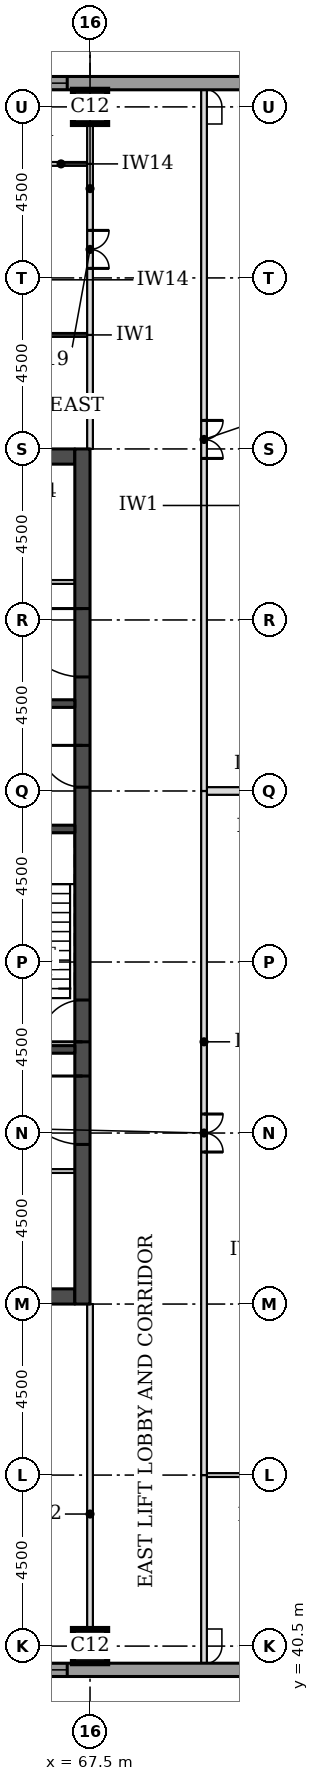
"""IFC4 building model, lengths in metres.
Left out: names, types, materials, properties, quantities, classifications, styles, units other than length and angle.
Written with IfcOpenShell. Run it as: python <this file> out.ifc"""

import sys

from ifc_helpers import new_model, si_unit, direction, frame, frame_2d, origin, origin_2d, place, context, subcontext, project, spatial, rectangle, extrude, element, fill, save


model = new_model("IFC4")
c1 = context("Model", 3, precision=1e-05, world=origin(), true_north=direction((0.0, 1.0)))
c2 = subcontext(c1, "Body", "Model", "MODEL_VIEW")
j1 = project(units=[si_unit("LENGTHUNIT", "METRE"), si_unit("PLANEANGLEUNIT", "RADIAN")], contexts=[c1])
p1 = place(None, origin())
s1 = spatial("IfcSite", under=j1, at=p1, CompositionType="ELEMENT")
p2 = place(p1, origin())
s2 = spatial("IfcBuilding", under=s1, at=p2, CompositionType="ELEMENT")
p3 = place(p2, frame((0.0, 0.0, 245.2)))
s3 = spatial("IfcBuildingStorey", under=s2, at=p3, CompositionType="ELEMENT", Elevation=245.2)
for number, where, z_axis, x_axis in (
    (1, (67.5, 40.5, 0.0), (0.0, 0.0, 1.0), (1.0, 0.0, 0.0)),
    (2, (67.5, 81.0, 0.0), (0.0, 0.0, 1.0), (1.0, 0.0, 0.0)),
):
    element("IfcColumn", number, at=place(p3, frame(where, z_axis=z_axis, x_axis=x_axis)), inside=s3, PredefinedType="COLUMN", context=c2, shape_type="SweptSolid", body=[
        extrude(rectangle(XDim=0.9, YDim=0.9, at=origin_2d()), origin(), (0.0, 0.0, 1.0), 3.7),
    ])
for number, where, z_axis, x_axis in (
    (3, (45.4, 49.7, 0.0), (0.0, 0.0, 1.0), (1.0, 0.0, 0.0)),
    (4, (45.4, 71.8, 0.0), (0.0, 0.0, 1.0), (1.0, 0.0, 0.0)),
):
    element("IfcWall", number, at=place(p3, frame(where, z_axis=z_axis, x_axis=x_axis)), inside=s3, PredefinedType="SHEAR", context=c2, shape_type="SweptSolid", body=[
        extrude(rectangle(XDim=21.7, YDim=0.4, at=frame_2d((10.85, 0.0))), origin(), (0.0, 0.0, 1.0), 3.7),
    ])
p4 = place(p3, frame((67.3, 49.5, 0.0), z_axis=(0.0, 0.0, 1.0), x_axis=(0.0, 1.0, 0.0)))
e5 = element("IfcWall", 5, at=p4, inside=s3, PredefinedType="SHEAR", context=c2, shape_type="SweptSolid", body=[
    extrude(rectangle(XDim=22.5, YDim=0.4, at=frame_2d((11.25, 0.0))), origin(), (0.0, 0.0, 1.0), 3.7),
])
p5 = place(p4, frame((4.2, 0.0, 0.0)))
e6 = element("IfcOpeningElement", 6, at=p5, cuts=e5, PredefinedType="OPENING", context=c2, shape_type="SweptSolid", body=[
    extrude(rectangle(XDim=1.8, YDim=2.1, at=frame_2d((0.9, 1.05))), frame((0.0, 0.21, 0.0), z_axis=(0.0, -1.0, 0.0), x_axis=(1.0, 0.0, 0.0)), (0.0, 0.0, 1.0), 0.42),
])
p6 = place(p4, frame((6.9, 0.0, 0.0)))
e7 = element("IfcOpeningElement", 7, at=p6, cuts=e5, PredefinedType="OPENING", context=c2, shape_type="SweptSolid", body=[
    extrude(rectangle(XDim=1.1, YDim=2.1, at=frame_2d((0.55, 1.05))), frame((0.0, 0.21, 0.0), z_axis=(0.0, -1.0, 0.0), x_axis=(1.0, 0.0, 0.0)), (0.0, 0.0, 1.0), 0.42),
])
p7 = place(p4, frame((13.6, 0.0, 0.0)))
e8 = element("IfcOpeningElement", 8, at=p7, cuts=e5, PredefinedType="OPENING", context=c2, shape_type="SweptSolid", body=[
    extrude(rectangle(XDim=1.1, YDim=2.1, at=frame_2d((0.55, 1.05))), frame((0.0, 0.21, 0.0), z_axis=(0.0, -1.0, 0.0), x_axis=(1.0, 0.0, 0.0)), (0.0, 0.0, 1.0), 0.42),
])
p8 = place(p4, frame((16.5, 0.0, 0.0)))
e9 = element("IfcOpeningElement", 9, at=p8, cuts=e5, PredefinedType="OPENING", context=c2, shape_type="SweptSolid", body=[
    extrude(rectangle(XDim=1.8, YDim=2.1, at=frame_2d((0.9, 1.05))), frame((0.0, 0.21, 0.0), z_axis=(0.0, -1.0, 0.0), x_axis=(1.0, 0.0, 0.0)), (0.0, 0.0, 1.0), 0.42),
])
p9 = place(p3, frame((36.0, 39.875, 0.0), z_axis=(0.0, 0.0, 1.0), x_axis=(1.0, 0.0, 0.0)))
e10 = element("IfcWall", 10, at=p9, inside=s3, PredefinedType="STANDARD", context=c2, shape_type="SweptSolid", body=[
    extrude(rectangle(XDim=36.331, YDim=0.35, at=frame_2d((18.166, 0.0))), origin(), (0.0, 0.0, 1.0), 3.525),
])
p10 = place(p9, frame((5.1, 0.0, 0.9)))
e11 = element("IfcOpeningElement", 11, at=p10, cuts=e10, PredefinedType="OPENING", context=c2, shape_type="SweptSolid", body=[
    extrude(rectangle(XDim=3.3, YDim=1.9, at=frame_2d((1.65, 0.95))), frame((0.0, 0.185, 0.0), z_axis=(0.0, -1.0, 0.0), x_axis=(1.0, 0.0, 0.0)), (0.0, 0.0, 1.0), 0.37),
])
p11 = place(p9, frame((9.6, 0.0, 0.9)))
e12 = element("IfcOpeningElement", 12, at=p11, cuts=e10, PredefinedType="OPENING", context=c2, shape_type="SweptSolid", body=[
    extrude(rectangle(XDim=3.3, YDim=1.9, at=frame_2d((1.65, 0.95))), frame((0.0, 0.185, 0.0), z_axis=(0.0, -1.0, 0.0), x_axis=(1.0, 0.0, 0.0)), (0.0, 0.0, 1.0), 0.37),
])
p12 = place(p9, frame((14.1, 0.0, 0.9)))
e13 = element("IfcOpeningElement", 13, at=p12, cuts=e10, PredefinedType="OPENING", context=c2, shape_type="SweptSolid", body=[
    extrude(rectangle(XDim=3.3, YDim=1.9, at=frame_2d((1.65, 0.95))), frame((0.0, 0.185, 0.0), z_axis=(0.0, -1.0, 0.0), x_axis=(1.0, 0.0, 0.0)), (0.0, 0.0, 1.0), 0.37),
])
p13 = place(p9, frame((18.6, 0.0, 0.9)))
e14 = element("IfcOpeningElement", 14, at=p13, cuts=e10, PredefinedType="OPENING", context=c2, shape_type="SweptSolid", body=[
    extrude(rectangle(XDim=3.3, YDim=1.9, at=frame_2d((1.65, 0.95))), frame((0.0, 0.185, 0.0), z_axis=(0.0, -1.0, 0.0), x_axis=(1.0, 0.0, 0.0)), (0.0, 0.0, 1.0), 0.37),
])
p14 = place(p9, frame((23.1, 0.0, 0.9)))
e15 = element("IfcOpeningElement", 15, at=p14, cuts=e10, PredefinedType="OPENING", context=c2, shape_type="SweptSolid", body=[
    extrude(rectangle(XDim=3.3, YDim=1.9, at=frame_2d((1.65, 0.95))), frame((0.0, 0.185, 0.0), z_axis=(0.0, -1.0, 0.0), x_axis=(1.0, 0.0, 0.0)), (0.0, 0.0, 1.0), 0.37),
])
p15 = place(p9, frame((27.6, 0.0, 0.9)))
e16 = element("IfcOpeningElement", 16, at=p15, cuts=e10, PredefinedType="OPENING", context=c2, shape_type="SweptSolid", body=[
    extrude(rectangle(XDim=3.3, YDim=1.9, at=frame_2d((1.65, 0.95))), frame((0.0, 0.185, 0.0), z_axis=(0.0, -1.0, 0.0), x_axis=(1.0, 0.0, 0.0)), (0.0, 0.0, 1.0), 0.37),
])
p16 = place(p3, frame((72.331, 81.625, 0.0), z_axis=(0.0, 0.0, 1.0), x_axis=(-1.0, 0.0, 0.0)))
e17 = element("IfcWall", 17, at=p16, inside=s3, PredefinedType="STANDARD", context=c2, shape_type="SweptSolid", body=[
    extrude(rectangle(XDim=32.163, YDim=0.35, at=frame_2d((16.081, 0.0))), origin(), (0.0, 0.0, 1.0), 3.525),
])
p17 = place(p16, frame((5.431, 0.0, 0.9)))
e18 = element("IfcOpeningElement", 18, at=p17, cuts=e17, PredefinedType="OPENING", context=c2, shape_type="SweptSolid", body=[
    extrude(rectangle(XDim=3.3, YDim=1.9, at=frame_2d((1.65, 0.95))), frame((0.0, 0.185, 0.0), z_axis=(0.0, -1.0, 0.0), x_axis=(1.0, 0.0, 0.0)), (0.0, 0.0, 1.0), 0.37),
])
p18 = place(p16, frame((9.931, 0.0, 0.9)))
e19 = element("IfcOpeningElement", 19, at=p18, cuts=e17, PredefinedType="OPENING", context=c2, shape_type="SweptSolid", body=[
    extrude(rectangle(XDim=3.3, YDim=1.9, at=frame_2d((1.65, 0.95))), frame((0.0, 0.185, 0.0), z_axis=(0.0, -1.0, 0.0), x_axis=(1.0, 0.0, 0.0)), (0.0, 0.0, 1.0), 0.37),
])
p19 = place(p16, frame((14.431, 0.0, 0.9)))
e20 = element("IfcOpeningElement", 20, at=p19, cuts=e17, PredefinedType="OPENING", context=c2, shape_type="SweptSolid", body=[
    extrude(rectangle(XDim=3.3, YDim=1.9, at=frame_2d((1.65, 0.95))), frame((0.0, 0.185, 0.0), z_axis=(0.0, -1.0, 0.0), x_axis=(1.0, 0.0, 0.0)), (0.0, 0.0, 1.0), 0.37),
])
p20 = place(p16, frame((18.931, 0.0, 0.9)))
e21 = element("IfcOpeningElement", 21, at=p20, cuts=e17, PredefinedType="OPENING", context=c2, shape_type="SweptSolid", body=[
    extrude(rectangle(XDim=3.3, YDim=1.9, at=frame_2d((1.65, 0.95))), frame((0.0, 0.185, 0.0), z_axis=(0.0, -1.0, 0.0), x_axis=(1.0, 0.0, 0.0)), (0.0, 0.0, 1.0), 0.37),
])
p21 = place(p16, frame((23.431, 0.0, 0.9)))
e22 = element("IfcOpeningElement", 22, at=p21, cuts=e17, PredefinedType="OPENING", context=c2, shape_type="SweptSolid", body=[
    extrude(rectangle(XDim=3.3, YDim=1.9, at=frame_2d((1.65, 0.95))), frame((0.0, 0.185, 0.0), z_axis=(0.0, -1.0, 0.0), x_axis=(1.0, 0.0, 0.0)), (0.0, 0.0, 1.0), 0.37),
])
p22 = place(p3, frame((70.575, 45.0, 0.0), z_axis=(0.0, 0.0, 1.0), x_axis=(1.0, 0.0, 0.0)))
e23 = element("IfcWall", 23, at=p22, inside=s3, PredefinedType="PARTITIONING", context=c2, shape_type="SweptSolid", body=[
    extrude(rectangle(XDim=2.925, YDim=0.1, at=frame_2d((1.462, 0.0))), origin(), (0.0, 0.0, 1.0), 3.096),
])
p23 = place(p22, frame((1.0, 0.0, 0.0)))
e24 = element("IfcOpeningElement", 24, at=p23, cuts=e23, PredefinedType="OPENING", context=c2, shape_type="SweptSolid", body=[
    extrude(rectangle(XDim=0.9, YDim=2.1, at=frame_2d((0.45, 1.05))), frame((0.0, 0.06, 0.0), z_axis=(0.0, -1.0, 0.0), x_axis=(1.0, 0.0, 0.0)), (0.0, 0.0, 1.0), 0.12),
])
p24 = place(p3, frame((70.575, 63.0, 0.0), z_axis=(0.0, 0.0, 1.0), x_axis=(1.0, 0.0, 0.0)))
e25 = element("IfcWall", 25, at=p24, inside=s3, PredefinedType="PARTITIONING", context=c2, shape_type="SweptSolid", body=[
    extrude(rectangle(XDim=2.925, YDim=0.2, at=frame_2d((1.462, 0.0))), origin(), (0.0, 0.0, 1.0), 3.55),
])
for number, where, z_axis, x_axis in (
    (26, (64.45, 75.0, 0.0), (0.0, 0.0, 1.0), (1.0, 0.0, 0.0)),
    (27, (64.45, 79.5, 0.0), (0.0, 0.0, 1.0), (1.0, 0.0, 0.0)),
):
    element("IfcWall", number, at=place(p3, frame(where, z_axis=z_axis, x_axis=x_axis)), inside=s3, PredefinedType="PARTITIONING", context=c2, shape_type="SweptSolid", body=[
        extrude(rectangle(XDim=2.975, YDim=0.1, at=frame_2d((1.488, 0.0))), origin(), (0.0, 0.0, 1.0), 3.55),
    ])
p25 = place(p3, frame((67.5, 40.05, 0.0), z_axis=(0.0, 0.0, 1.0), x_axis=(0.0, 1.0, 0.0)))
e28 = element("IfcWall", 28, at=p25, inside=s3, PredefinedType="PARTITIONING", context=c2, shape_type="SweptSolid", body=[
    extrude(rectangle(XDim=9.45, YDim=0.15, at=frame_2d((4.725, 0.0))), origin(), (0.0, 0.0, 1.0), 3.022),
])
p26 = place(p3, frame((70.5, 40.05, 0.0), z_axis=(0.0, 0.0, 1.0), x_axis=(0.0, 1.0, 0.0)))
e29 = element("IfcWall", 29, at=p26, inside=s3, PredefinedType="PARTITIONING", context=c2, shape_type="SweptSolid", body=[
    extrude(rectangle(XDim=4.95, YDim=0.15, at=frame_2d((2.475, 0.0))), origin(), (0.0, 0.0, 1.0), 3.55),
])
p27 = place(p3, frame((70.5, 45.0, 0.0), z_axis=(0.0, 0.0, 1.0), x_axis=(0.0, 1.0, 0.0)))
e30 = element("IfcWall", 30, at=p27, inside=s3, PredefinedType="PARTITIONING", context=c2, shape_type="SweptSolid", body=[
    extrude(rectangle(XDim=18.0, YDim=0.15, at=frame_2d((9.0, 0.0))), origin(), (0.0, 0.0, 1.0), 3.55),
])
p28 = place(p27, frame((8.5, 0.0, 0.0)))
e31 = element("IfcOpeningElement", 31, at=p28, cuts=e30, PredefinedType="OPENING", context=c2, shape_type="SweptSolid", body=[
    extrude(rectangle(XDim=1.0, YDim=2.1, at=frame_2d((0.5, 1.05))), frame((0.0, 0.085, 0.0), z_axis=(0.0, -1.0, 0.0), x_axis=(1.0, 0.0, 0.0)), (0.0, 0.0, 1.0), 0.17),
])
p29 = place(p3, frame((70.5, 63.0, 0.0), z_axis=(0.0, 0.0, 1.0), x_axis=(0.0, 1.0, 0.0)))
e32 = element("IfcWall", 32, at=p29, inside=s3, PredefinedType="PARTITIONING", context=c2, shape_type="SweptSolid", body=[
    extrude(rectangle(XDim=18.45, YDim=0.15, at=frame_2d((9.225, 0.0))), origin(), (0.0, 0.0, 1.0), 3.55),
])
p30 = place(p29, frame((8.75, 0.0, 0.0)))
e33 = element("IfcOpeningElement", 33, at=p30, cuts=e32, PredefinedType="OPENING", context=c2, shape_type="SweptSolid", body=[
    extrude(rectangle(XDim=1.0, YDim=2.1, at=frame_2d((0.5, 1.05))), frame((0.0, 0.085, 0.0), z_axis=(0.0, -1.0, 0.0), x_axis=(1.0, 0.0, 0.0)), (0.0, 0.0, 1.0), 0.17),
])
p31 = place(p3, frame((67.5, 72.0, 0.0), z_axis=(0.0, 0.0, 1.0), x_axis=(0.0, 1.0, 0.0)))
e34 = element("IfcWall", 34, at=p31, inside=s3, PredefinedType="PARTITIONING", context=c2, shape_type="SweptSolid", body=[
    extrude(rectangle(XDim=3.0, YDim=0.15, at=frame_2d((1.5, 0.0))), origin(), (0.0, 0.0, 1.0), 3.022),
])
p32 = place(p3, frame((67.5, 75.0, 0.0), z_axis=(0.0, 0.0, 1.0), x_axis=(0.0, 1.0, 0.0)))
e35 = element("IfcWall", 35, at=p32, inside=s3, PredefinedType="PARTITIONING", context=c2, shape_type="SweptSolid", body=[
    extrude(rectangle(XDim=4.5, YDim=0.15, at=frame_2d((2.25, 0.0))), origin(), (0.0, 0.0, 1.0), 3.022),
])
p33 = place(p32, frame((1.75, 0.0, 0.0)))
e36 = element("IfcOpeningElement", 36, at=p33, cuts=e35, PredefinedType="OPENING", context=c2, shape_type="SweptSolid", body=[
    extrude(rectangle(XDim=1.0, YDim=2.1, at=frame_2d((0.5, 1.05))), frame((0.0, 0.085, 0.0), z_axis=(0.0, -1.0, 0.0), x_axis=(1.0, 0.0, 0.0)), (0.0, 0.0, 1.0), 0.17),
])
p34 = place(p3, frame((67.5, 79.5, 0.0), z_axis=(0.0, 0.0, 1.0), x_axis=(0.0, 1.0, 0.0)))
e37 = element("IfcWall", 37, at=p34, inside=s3, PredefinedType="PARTITIONING", context=c2, shape_type="SweptSolid", body=[
    extrude(rectangle(XDim=1.95, YDim=0.15, at=frame_2d((0.975, 0.0))), origin(), (0.0, 0.0, 1.0), 3.022),
])
p35 = place(p3, frame((45.4, 53.0, 0.0), z_axis=(0.0, 0.0, 1.0), x_axis=(1.0, 0.0, 0.0)))
e38 = element("IfcWall", 38, at=p35, inside=s3, PredefinedType="PARTITIONING", context=c2, shape_type="SweptSolid", body=[
    extrude(rectangle(XDim=21.7, YDim=0.1, at=frame_2d((10.85, 0.0))), origin(), (0.0, 0.0, 1.0), 3.55),
])
p36 = place(p35, frame((19.938, 0.0, 0.0)))
e39 = element("IfcOpeningElement", 39, at=p36, cuts=e38, PredefinedType="OPENING", context=c2, shape_type="SweptSolid", body=[
    extrude(rectangle(XDim=0.9, YDim=2.1, at=frame_2d((0.45, 1.05))), frame((0.0, 0.06, 0.0), z_axis=(0.0, -1.0, 0.0), x_axis=(1.0, 0.0, 0.0)), (0.0, 0.0, 1.0), 0.12),
])
p37 = place(p35, frame((17.262, 0.0, 0.0)))
e40 = element("IfcOpeningElement", 40, at=p37, cuts=e38, PredefinedType="OPENING", context=c2, shape_type="SweptSolid", body=[
    extrude(rectangle(XDim=1.0, YDim=2.1, at=frame_2d((0.5, 1.05))), frame((0.0, 0.06, 0.0), z_axis=(0.0, -1.0, 0.0), x_axis=(1.0, 0.0, 0.0)), (0.0, 0.0, 1.0), 0.12),
])
p38 = place(p35, frame((0.994, 0.0, 0.0)))
e41 = element("IfcOpeningElement", 41, at=p38, cuts=e38, PredefinedType="OPENING", context=c2, shape_type="SweptSolid", body=[
    extrude(rectangle(XDim=0.9, YDim=2.1, at=frame_2d((0.45, 1.05))), frame((0.0, 0.06, 0.0), z_axis=(0.0, -1.0, 0.0), x_axis=(1.0, 0.0, 0.0)), (0.0, 0.0, 1.0), 0.12),
])
p39 = place(p35, frame((3.619, 0.0, 0.0)))
e42 = element("IfcOpeningElement", 42, at=p39, cuts=e38, PredefinedType="OPENING", context=c2, shape_type="SweptSolid", body=[
    extrude(rectangle(XDim=0.9, YDim=2.1, at=frame_2d((0.45, 1.05))), frame((0.0, 0.06, 0.0), z_axis=(0.0, -1.0, 0.0), x_axis=(1.0, 0.0, 0.0)), (0.0, 0.0, 1.0), 0.12),
])
p40 = place(p35, frame((7.88, 0.0, 0.0)))
e43 = element("IfcOpeningElement", 43, at=p40, cuts=e38, PredefinedType="OPENING", context=c2, shape_type="SweptSolid", body=[
    extrude(rectangle(XDim=0.9, YDim=2.1, at=frame_2d((0.45, 1.05))), frame((0.0, 0.06, 0.0), z_axis=(0.0, -1.0, 0.0), x_axis=(1.0, 0.0, 0.0)), (0.0, 0.0, 1.0), 0.12),
])
p41 = place(p35, frame((13.48, 0.0, 0.0)))
e44 = element("IfcOpeningElement", 44, at=p41, cuts=e38, PredefinedType="OPENING", context=c2, shape_type="SweptSolid", body=[
    extrude(rectangle(XDim=0.9, YDim=2.1, at=frame_2d((0.45, 1.05))), frame((0.0, 0.06, 0.0), z_axis=(0.0, -1.0, 0.0), x_axis=(1.0, 0.0, 0.0)), (0.0, 0.0, 1.0), 0.12),
])
p42 = place(p3, frame((63.9, 56.2, 0.0), z_axis=(0.0, 0.0, 1.0), x_axis=(1.0, 0.0, 0.0)))
e45 = element("IfcWall", 45, at=p42, inside=s3, PredefinedType="SOLIDWALL", context=c2, shape_type="SweptSolid", body=[
    extrude(rectangle(XDim=3.2, YDim=0.2, at=frame_2d((1.6, 0.0))), origin(), (0.0, 0.0, 1.0), 3.55),
])
p43 = place(p3, frame((61.85, 62.0, 0.0), z_axis=(0.0, 0.0, 1.0), x_axis=(1.0, 0.0, 0.0)))
e46 = element("IfcWall", 46, at=p43, inside=s3, PredefinedType="SOLIDWALL", context=c2, shape_type="SweptSolid", body=[
    extrude(rectangle(XDim=5.25, YDim=0.2, at=frame_2d((2.625, 0.0))), origin(), (0.0, 0.0, 1.0), 3.55),
])
p44 = place(p3, frame((64.7, 65.3, 0.0), z_axis=(0.0, 0.0, 1.0), x_axis=(1.0, 0.0, 0.0)))
e47 = element("IfcWall", 47, at=p44, inside=s3, PredefinedType="SOLIDWALL", context=c2, shape_type="SweptSolid", body=[
    extrude(rectangle(XDim=2.4, YDim=0.2, at=frame_2d((1.2, 0.0))), origin(), (0.0, 0.0, 1.0), 3.55),
])
p45 = place(p3, frame((45.4, 68.5, 0.0), z_axis=(0.0, 0.0, 1.0), x_axis=(1.0, 0.0, 0.0)))
e48 = element("IfcWall", 48, at=p45, inside=s3, PredefinedType="PARTITIONING", context=c2, shape_type="SweptSolid", body=[
    extrude(rectangle(XDim=21.7, YDim=0.1, at=frame_2d((10.85, 0.0))), origin(), (0.0, 0.0, 1.0), 3.55),
])
p46 = place(p45, frame((19.938, 0.0, 0.0)))
e49 = element("IfcOpeningElement", 49, at=p46, cuts=e48, PredefinedType="OPENING", context=c2, shape_type="SweptSolid", body=[
    extrude(rectangle(XDim=0.9, YDim=2.1, at=frame_2d((0.45, 1.05))), frame((0.0, 0.06, 0.0), z_axis=(0.0, -1.0, 0.0), x_axis=(1.0, 0.0, 0.0)), (0.0, 0.0, 1.0), 0.12),
])
p47 = place(p45, frame((17.312, 0.0, 0.0)))
e50 = element("IfcOpeningElement", 50, at=p47, cuts=e48, PredefinedType="OPENING", context=c2, shape_type="SweptSolid", body=[
    extrude(rectangle(XDim=0.9, YDim=2.1, at=frame_2d((0.45, 1.05))), frame((0.0, 0.06, 0.0), z_axis=(0.0, -1.0, 0.0), x_axis=(1.0, 0.0, 0.0)), (0.0, 0.0, 1.0), 0.12),
])
p48 = place(p45, frame((0.442, 0.0, 0.0)))
e51 = element("IfcOpeningElement", 51, at=p48, cuts=e48, PredefinedType="OPENING", context=c2, shape_type="SweptSolid", body=[
    extrude(rectangle(XDim=0.9, YDim=2.1, at=frame_2d((0.45, 1.05))), frame((0.0, 0.06, 0.0), z_axis=(0.0, -1.0, 0.0), x_axis=(1.0, 0.0, 0.0)), (0.0, 0.0, 1.0), 0.12),
])
p49 = place(p45, frame((2.201, 0.0, 0.0)))
e52 = element("IfcOpeningElement", 52, at=p49, cuts=e48, PredefinedType="OPENING", context=c2, shape_type="SweptSolid", body=[
    extrude(rectangle(XDim=0.9, YDim=2.1, at=frame_2d((0.45, 1.05))), frame((0.0, 0.06, 0.0), z_axis=(0.0, -1.0, 0.0), x_axis=(1.0, 0.0, 0.0)), (0.0, 0.0, 1.0), 0.12),
])
p50 = place(p45, frame((3.934, 0.0, 0.0)))
e53 = element("IfcOpeningElement", 53, at=p50, cuts=e48, PredefinedType="OPENING", context=c2, shape_type="SweptSolid", body=[
    extrude(rectangle(XDim=0.9, YDim=2.1, at=frame_2d((0.45, 1.05))), frame((0.0, 0.06, 0.0), z_axis=(0.0, -1.0, 0.0), x_axis=(1.0, 0.0, 0.0)), (0.0, 0.0, 1.0), 0.12),
])
p51 = place(p45, frame((12.92, 0.0, 0.0)))
e54 = element("IfcOpeningElement", 54, at=p51, cuts=e48, PredefinedType="OPENING", context=c2, shape_type="SweptSolid", body=[
    extrude(rectangle(XDim=0.9, YDim=2.1, at=frame_2d((0.45, 1.05))), frame((0.0, 0.06, 0.0), z_axis=(0.0, -1.0, 0.0), x_axis=(1.0, 0.0, 0.0)), (0.0, 0.0, 1.0), 0.12),
])
p52 = place(p45, frame((7.32, 0.0, 0.0)))
e55 = element("IfcOpeningElement", 55, at=p52, cuts=e48, PredefinedType="OPENING", context=c2, shape_type="SweptSolid", body=[
    extrude(rectangle(XDim=0.9, YDim=2.1, at=frame_2d((0.45, 1.05))), frame((0.0, 0.06, 0.0), z_axis=(0.0, -1.0, 0.0), x_axis=(1.0, 0.0, 0.0)), (0.0, 0.0, 1.0), 0.12),
])
p53 = place(p15, origin())
e56 = element("IfcWindow", 56, at=p53, inside=s3, PartitioningType="SINGLE_PANEL", PredefinedType="WINDOW", context=c2, shape_type="SweptSolid", body=[
    extrude(rectangle(XDim=3.3, YDim=1.9, at=frame_2d((1.65, 0.95))), frame((0.0, 0.085, 0.0), z_axis=(0.0, -1.0, 0.0), x_axis=(1.0, 0.0, 0.0)), (0.0, 0.0, 1.0), 0.06),
])
fill(e16, e56)
p54 = place(p17, origin())
e57 = element("IfcWindow", 57, at=p54, inside=s3, PartitioningType="SINGLE_PANEL", PredefinedType="WINDOW", context=c2, shape_type="SweptSolid", body=[
    extrude(rectangle(XDim=3.3, YDim=1.9, at=frame_2d((1.65, 0.95))), frame((0.0, 0.085, 0.0), z_axis=(0.0, -1.0, 0.0), x_axis=(1.0, 0.0, 0.0)), (0.0, 0.0, 1.0), 0.06),
])
fill(e18, e57)
p55 = place(p33, frame((1.0, 0.0, 0.0), z_axis=(0.0, 0.0, 1.0), x_axis=(-1.0, 0.0, 0.0)))
e58 = element("IfcDoor", 58, at=p55, inside=s3, OperationType="DOUBLE_DOOR_SINGLE_SWING", PredefinedType="DOOR", context=c2, shape_type="SweptSolid", body=[
    extrude(rectangle(XDim=1.0, YDim=2.1, at=frame_2d((0.5, 1.05))), frame((0.0, 0.025, 0.0), z_axis=(0.0, -1.0, 0.0), x_axis=(1.0, 0.0, 0.0)), (0.0, 0.0, 1.0), 0.05),
])
fill(e36, e58)
p56 = place(p28, frame((1.0, 0.0, 0.0), z_axis=(0.0, 0.0, 1.0), x_axis=(-1.0, 0.0, 0.0)))
e59 = element("IfcDoor", 59, at=p56, inside=s3, OperationType="DOUBLE_DOOR_SINGLE_SWING", PredefinedType="DOOR", context=c2, shape_type="SweptSolid", body=[
    extrude(rectangle(XDim=1.0, YDim=2.1, at=frame_2d((0.5, 1.05))), frame((0.0, 0.025, 0.0), z_axis=(0.0, -1.0, 0.0), x_axis=(1.0, 0.0, 0.0)), (0.0, 0.0, 1.0), 0.05),
])
fill(e31, e59)
p57 = place(p30, frame((1.0, 0.0, 0.0), z_axis=(0.0, 0.0, 1.0), x_axis=(-1.0, 0.0, 0.0)))
e60 = element("IfcDoor", 60, at=p57, inside=s3, OperationType="DOUBLE_DOOR_SINGLE_SWING", PredefinedType="DOOR", context=c2, shape_type="SweptSolid", body=[
    extrude(rectangle(XDim=1.0, YDim=2.1, at=frame_2d((0.5, 1.05))), frame((0.0, 0.025, 0.0), z_axis=(0.0, -1.0, 0.0), x_axis=(1.0, 0.0, 0.0)), (0.0, 0.0, 1.0), 0.05),
])
fill(e33, e60)
p58 = place(p5, origin())
e61 = element("IfcDoor", 61, at=p58, inside=s3, OperationType="SINGLE_SWING_RIGHT", PredefinedType="DOOR", context=c2, shape_type="SweptSolid", body=[
    extrude(rectangle(XDim=1.8, YDim=2.1, at=frame_2d((0.9, 1.05))), frame((0.0, 0.025, 0.0), z_axis=(0.0, -1.0, 0.0), x_axis=(1.0, 0.0, 0.0)), (0.0, 0.0, 1.0), 0.05),
])
fill(e6, e61)
p59 = place(p6, origin())
e62 = element("IfcDoor", 62, at=p59, inside=s3, OperationType="SINGLE_SWING_LEFT", PredefinedType="DOOR", context=c2, shape_type="SweptSolid", body=[
    extrude(rectangle(XDim=1.1, YDim=2.1, at=frame_2d((0.55, 1.05))), frame((0.0, 0.025, 0.0), z_axis=(0.0, -1.0, 0.0), x_axis=(1.0, 0.0, 0.0)), (0.0, 0.0, 1.0), 0.05),
])
fill(e7, e62)
p60 = place(p7, origin())
e63 = element("IfcDoor", 63, at=p60, inside=s3, OperationType="SINGLE_SWING_RIGHT", PredefinedType="DOOR", context=c2, shape_type="SweptSolid", body=[
    extrude(rectangle(XDim=1.1, YDim=2.1, at=frame_2d((0.55, 1.05))), frame((0.0, 0.025, 0.0), z_axis=(0.0, -1.0, 0.0), x_axis=(1.0, 0.0, 0.0)), (0.0, 0.0, 1.0), 0.05),
])
fill(e8, e63)
p61 = place(p8, origin())
e64 = element("IfcDoor", 64, at=p61, inside=s3, OperationType="SINGLE_SWING_RIGHT", PredefinedType="DOOR", context=c2, shape_type="SweptSolid", body=[
    extrude(rectangle(XDim=1.8, YDim=2.1, at=frame_2d((0.9, 1.05))), frame((0.0, 0.025, 0.0), z_axis=(0.0, -1.0, 0.0), x_axis=(1.0, 0.0, 0.0)), (0.0, 0.0, 1.0), 0.05),
])
fill(e9, e64)
save(model, sys.argv[1])
